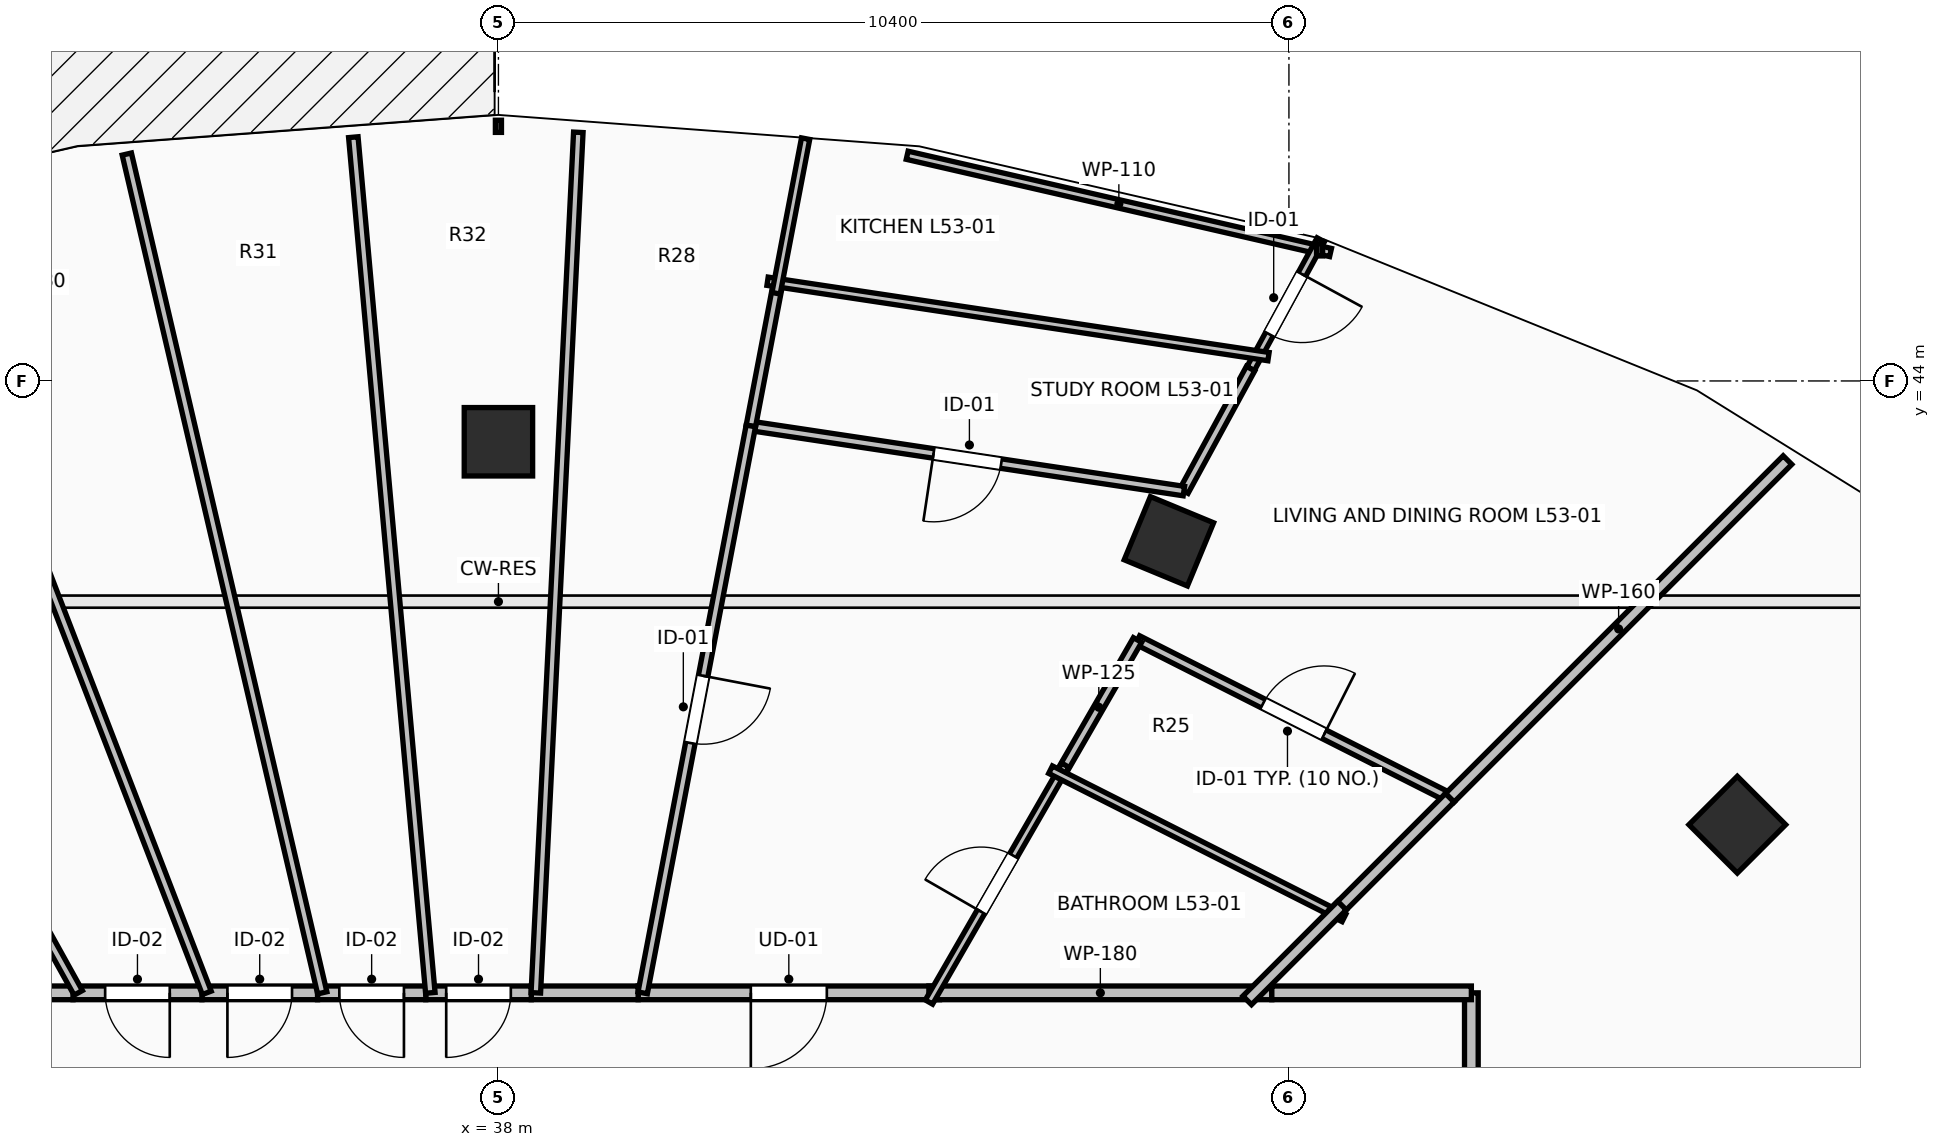
"""IFC4 building model, lengths in metres.
Left out: names, types, materials, properties, quantities, classifications, styles, units other than length and angle.
Written with IfcOpenShell. Run it as: python <this file> out.ifc"""

import sys

from ifc_helpers import new_model, si_unit, direction, frame, frame_2d, origin, origin_2d, place, context, subcontext, project, spatial, rectangle, extrude, element, fill, save


model = new_model("IFC4")
c1 = context("Model", 3, precision=1e-05, world=origin(), true_north=direction((0.0, 1.0)))
c2 = subcontext(c1, "Body", "Model", "MODEL_VIEW")
j1 = project(units=[si_unit("LENGTHUNIT", "METRE"), si_unit("PLANEANGLEUNIT", "RADIAN")], contexts=[c1])
p1 = place(None, origin())
s1 = spatial("IfcSite", under=j1, at=p1, CompositionType="ELEMENT")
p2 = place(p1, origin())
s2 = spatial("IfcBuilding", under=s1, at=p2, CompositionType="ELEMENT")
p3 = place(p2, frame((0.0, 0.0, 196.6)))
s3 = spatial("IfcBuildingStorey", under=s2, at=p3, CompositionType="ELEMENT", Elevation=196.6)
for number, where, z_axis, x_axis in (
    (1, (54.299, 38.162, 0.0), (0.0, 0.0, 1.0), (0.707, 0.707, 0.0)),
    (2, (46.821, 41.891, 0.0), (0.0, 0.0, 1.0), (0.383, 0.924, 0.0)),
    (3, (38.0, 43.2, 0.0), (0.0, 0.0, 1.0), (0.0, 1.0, 0.0)),
):
    element("IfcColumn", number, at=place(p3, frame(where, z_axis=z_axis, x_axis=x_axis)), inside=s3, PredefinedType="COLUMN", context=c2, shape_type="SweptSolid", body=[
        extrude(rectangle(XDim=0.9, YDim=0.9, at=origin_2d()), origin(), (0.0, 0.0, 1.0), 3.5),
    ])
p4 = place(p3, frame((43.803, 35.95, 0.0), z_axis=(0.0, 0.0, 1.0), x_axis=(-1.0, 0.0, 0.0)))
e4 = element("IfcWall", 4, at=p4, inside=s3, PredefinedType="PARTITIONING", context=c2, shape_type="SweptSolid", body=[
    extrude(rectangle(XDim=3.965, YDim=0.18, at=frame_2d((1.982, 0.0))), origin(), (0.0, 0.0, 1.0), 3.24),
])
p5 = place(p4, frame((1.482, 0.0, 0.0)))
e5 = element("IfcOpeningElement", 5, at=p5, cuts=e4, PredefinedType="OPENING", context=c2, shape_type="SweptSolid", body=[
    extrude(rectangle(XDim=1.0, YDim=2.15, at=frame_2d((0.5, 1.075))), frame((0.0, 0.105, 0.0), z_axis=(0.0, -1.0, 0.0), x_axis=(1.0, 0.0, 0.0)), (0.0, 0.0, 1.0), 0.21),
])
p6 = place(p3, frame((48.175, 35.95, 0.0), z_axis=(0.0, 0.0, 1.0), x_axis=(-1.0, 0.0, 0.0)))
e6 = element("IfcWall", 6, at=p6, inside=s3, PredefinedType="PARTITIONING", context=c2, shape_type="SweptSolid", body=[
    extrude(rectangle(XDim=4.512, YDim=0.18, at=frame_2d((2.256, 0.0))), origin(), (0.0, 0.0, 1.0), 2.432),
])
p7 = place(p3, frame((39.838, 35.95, 0.0), z_axis=(0.0, 0.0, 1.0), x_axis=(-1.0, 0.0, 0.0)))
e7 = element("IfcWall", 7, at=p7, inside=s3, PredefinedType="PARTITIONING", context=c2, shape_type="SweptSolid", body=[
    extrude(rectangle(XDim=1.406, YDim=0.18, at=frame_2d((0.703, 0.0))), origin(), (0.0, 0.0, 1.0), 3.24),
])
p8 = place(p3, frame((38.432, 35.95, 0.0), z_axis=(0.0, 0.0, 1.0), x_axis=(-1.0, 0.0, 0.0)))
e8 = element("IfcWall", 8, at=p8, inside=s3, PredefinedType="PARTITIONING", context=c2, shape_type="SweptSolid", body=[
    extrude(rectangle(XDim=1.388, YDim=0.18, at=frame_2d((0.694, 0.0))), origin(), (0.0, 0.0, 1.0), 3.24),
])
p9 = place(p8, frame((0.269, 0.0, 0.0)))
e9 = element("IfcOpeningElement", 9, at=p9, cuts=e8, PredefinedType="OPENING", context=c2, shape_type="SweptSolid", body=[
    extrude(rectangle(XDim=0.85, YDim=2.1, at=frame_2d((0.425, 1.05))), frame((0.0, 0.105, 0.0), z_axis=(0.0, -1.0, 0.0), x_axis=(1.0, 0.0, 0.0)), (0.0, 0.0, 1.0), 0.21),
])
p10 = place(p3, frame((37.044, 35.95, 0.0), z_axis=(0.0, 0.0, 1.0), x_axis=(-1.0, 0.0, 0.0)))
e10 = element("IfcWall", 10, at=p10, inside=s3, PredefinedType="PARTITIONING", context=c2, shape_type="SweptSolid", body=[
    extrude(rectangle(XDim=1.424, YDim=0.18, at=frame_2d((0.712, 0.0))), origin(), (0.0, 0.0, 1.0), 3.24),
])
p11 = place(p10, frame((0.287, 0.0, 0.0)))
e11 = element("IfcOpeningElement", 11, at=p11, cuts=e10, PredefinedType="OPENING", context=c2, shape_type="SweptSolid", body=[
    extrude(rectangle(XDim=0.85, YDim=2.1, at=frame_2d((0.425, 1.05))), frame((0.0, 0.105, 0.0), z_axis=(0.0, -1.0, 0.0), x_axis=(1.0, 0.0, 0.0)), (0.0, 0.0, 1.0), 0.21),
])
p12 = place(p3, frame((35.62, 35.95, 0.0), z_axis=(0.0, 0.0, 1.0), x_axis=(-1.0, 0.0, 0.0)))
e12 = element("IfcWall", 12, at=p12, inside=s3, PredefinedType="PARTITIONING", context=c2, shape_type="SweptSolid", body=[
    extrude(rectangle(XDim=1.521, YDim=0.18, at=frame_2d((0.76, 0.0))), origin(), (0.0, 0.0, 1.0), 3.24),
])
p13 = place(p12, frame((0.335, 0.0, 0.0)))
e13 = element("IfcOpeningElement", 13, at=p13, cuts=e12, PredefinedType="OPENING", context=c2, shape_type="SweptSolid", body=[
    extrude(rectangle(XDim=0.85, YDim=2.1, at=frame_2d((0.425, 1.05))), frame((0.0, 0.105, 0.0), z_axis=(0.0, -1.0, 0.0), x_axis=(1.0, 0.0, 0.0)), (0.0, 0.0, 1.0), 0.21),
])
p14 = place(p3, frame((34.099, 35.95, 0.0), z_axis=(0.0, 0.0, 1.0), x_axis=(-1.0, 0.0, 0.0)))
e14 = element("IfcWall", 14, at=p14, inside=s3, PredefinedType="PARTITIONING", context=c2, shape_type="SweptSolid", body=[
    extrude(rectangle(XDim=1.696, YDim=0.18, at=frame_2d((0.848, 0.0))), origin(), (0.0, 0.0, 1.0), 3.24),
])
p15 = place(p14, frame((0.423, 0.0, 0.0)))
e15 = element("IfcOpeningElement", 15, at=p15, cuts=e14, PredefinedType="OPENING", context=c2, shape_type="SweptSolid", body=[
    extrude(rectangle(XDim=0.85, YDim=2.1, at=frame_2d((0.425, 1.05))), frame((0.0, 0.105, 0.0), z_axis=(0.0, -1.0, 0.0), x_axis=(1.0, 0.0, 0.0)), (0.0, 0.0, 1.0), 0.21),
])
p16 = place(p3, frame((32.403, 35.95, 0.0), z_axis=(0.0, 0.0, 1.0), x_axis=(-1.0, 0.0, 0.0)))
e16 = element("IfcWall", 16, at=p16, inside=s3, PredefinedType="PARTITIONING", context=c2, shape_type="SweptSolid", body=[
    extrude(rectangle(XDim=1.984, YDim=0.18, at=frame_2d((0.992, 0.0))), origin(), (0.0, 0.0, 1.0), 2.432),
])
p17 = place(p16, frame((0.567, 0.0, 0.0)))
e17 = element("IfcOpeningElement", 17, at=p17, cuts=e16, PredefinedType="OPENING", context=c2, shape_type="SweptSolid", body=[
    extrude(rectangle(XDim=0.85, YDim=2.1, at=frame_2d((0.425, 1.05))), frame((0.0, 0.105, 0.0), z_axis=(0.0, -1.0, 0.0), x_axis=(1.0, 0.0, 0.0)), (0.0, 0.0, 1.0), 0.21),
])
p18 = place(p3, frame((50.8, 27.25, 0.0), z_axis=(0.0, 0.0, 1.0), x_axis=(0.0, 1.0, 0.0)))
e18 = element("IfcWall", 18, at=p18, inside=s3, PredefinedType="PARTITIONING", context=c2, shape_type="SweptSolid", body=[
    extrude(rectangle(XDim=8.7, YDim=0.18, at=frame_2d((4.35, 0.0))), origin(), (0.0, 0.0, 1.0), 2.432),
])
p19 = place(p3, frame((50.8, 35.95, 0.0), z_axis=(0.0, 0.0, 1.0), x_axis=(-1.0, 0.0, 0.0)))
e19 = element("IfcWall", 19, at=p19, inside=s3, PredefinedType="PARTITIONING", context=c2, shape_type="SweptSolid", body=[
    extrude(rectangle(XDim=2.625, YDim=0.18, at=frame_2d((1.312, 0.0))), origin(), (0.0, 0.0, 1.0), 2.432),
])
p20 = place(p3, frame((46.408, 40.592, 0.0), z_axis=(0.0, 0.0, 1.0), x_axis=(0.89252026196, -0.451007297049, 0.0)))
e20 = element("IfcWall", 20, at=p20, inside=s3, PredefinedType="PARTITIONING", context=c2, shape_type="SweptSolid", body=[
    extrude(rectangle(XDim=4.603, YDim=0.125, at=frame_2d((2.301, 0.0))), origin(), (0.0, 0.0, 1.0), 2.432),
])
p21 = place(p20, frame((1.851, 0.0, 0.0)))
e21 = element("IfcOpeningElement", 21, at=p21, cuts=e20, PredefinedType="OPENING", context=c2, shape_type="SweptSolid", body=[
    extrude(rectangle(XDim=0.9, YDim=2.1, at=frame_2d((0.45, 1.05))), frame((0.0, 0.077, 0.0), z_axis=(0.0, -1.0, 0.0), x_axis=(1.0, 0.0, 0.0)), (0.0, 0.0, 1.0), 0.155),
])
p22 = place(p3, frame((45.389, 38.823, 0.0), z_axis=(0.0, 0.0, 1.0), x_axis=(0.499149502221, 0.866515882389, 0.0)))
e22 = element("IfcWall", 22, at=p22, inside=s3, PredefinedType="PARTITIONING", context=c2, shape_type="SweptSolid", body=[
    extrude(rectangle(XDim=2.042, YDim=0.125, at=frame_2d((1.021, 0.0))), origin(), (0.0, 0.0, 1.0), 2.922),
])
p23 = place(p3, frame((43.664, 35.829, 0.0), z_axis=(0.0, 0.0, 1.0), x_axis=(0.49917767271, 0.866499654396, 0.0)))
e23 = element("IfcWall", 23, at=p23, inside=s3, PredefinedType="PARTITIONING", context=c2, shape_type="SweptSolid", body=[
    extrude(rectangle(XDim=3.596, YDim=0.11, at=frame_2d((1.798, 0.0))), origin(), (0.0, 0.0, 1.0), 2.972),
])
p24 = place(p23, frame((1.373, 0.0, 0.0)))
e24 = element("IfcOpeningElement", 24, at=p24, cuts=e23, PredefinedType="OPENING", context=c2, shape_type="SweptSolid", body=[
    extrude(rectangle(XDim=0.85, YDim=2.1, at=frame_2d((0.425, 1.05))), frame((0.0, 0.07, 0.0), z_axis=(0.0, -1.0, 0.0), x_axis=(1.0, 0.0, 0.0)), (0.0, 0.0, 1.0), 0.14),
])
p25 = place(p3, frame((48.948, 45.69, 0.0), z_axis=(0.0, 0.0, 1.0), x_axis=(-0.974613198555, 0.223895317508, 0.0)))
e25 = element("IfcWall", 25, at=p25, inside=s3, PredefinedType="PARTITIONING", context=c2, shape_type="SweptSolid", body=[
    extrude(rectangle(XDim=5.715, YDim=0.11, at=frame_2d((2.857, 0.0))), origin(), (0.0, 0.0, 1.0), 3.24),
])
p26 = place(p3, frame((48.819, 45.857, 0.0), z_axis=(0.0, 0.0, 1.0), x_axis=(-0.478311376557, -0.878190313689, 0.0)))
e26 = element("IfcWall", 26, at=p26, inside=s3, PredefinedType="PARTITIONING", context=c2, shape_type="SweptSolid", body=[
    extrude(rectangle(XDim=1.93, YDim=0.11, at=frame_2d((0.965, 0.0))), origin(), (0.0, 0.0, 1.0), 3.24),
])
p27 = place(p26, frame((0.515, 0.0, 0.0)))
e27 = element("IfcOpeningElement", 27, at=p27, cuts=e26, PredefinedType="OPENING", context=c2, shape_type="SweptSolid", body=[
    extrude(rectangle(XDim=0.9, YDim=2.1, at=frame_2d((0.45, 1.05))), frame((0.0, 0.07, 0.0), z_axis=(0.0, -1.0, 0.0), x_axis=(1.0, 0.0, 0.0)), (0.0, 0.0, 1.0), 0.14),
])
p28 = place(p3, frame((47.896, 44.162, 0.0), z_axis=(0.0, 0.0, 1.0), x_axis=(-0.47839521225, -0.87814464691, 0.0)))
e28 = element("IfcWall", 28, at=p28, inside=s3, PredefinedType="PARTITIONING", context=c2, shape_type="SweptSolid", body=[
    extrude(rectangle(XDim=1.835, YDim=0.125, at=frame_2d((0.917, 0.0))), origin(), (0.0, 0.0, 1.0), 3.24),
])
p29 = place(p3, frame((47.018, 42.551, 0.0), z_axis=(0.0, 0.0, 1.0), x_axis=(-0.98887565722, 0.148744527827, 0.0)))
e29 = element("IfcWall", 29, at=p29, inside=s3, PredefinedType="PARTITIONING", context=c2, shape_type="SweptSolid", body=[
    extrude(rectangle(XDim=5.761, YDim=0.125, at=frame_2d((2.881, 0.0))), origin(), (0.0, 0.0, 1.0), 3.24),
])
p30 = place(p29, frame((2.43, 0.0, 0.0)))
e30 = element("IfcOpeningElement", 30, at=p30, cuts=e29, PredefinedType="OPENING", context=c2, shape_type="SweptSolid", body=[
    extrude(rectangle(XDim=0.9, YDim=2.1, at=frame_2d((0.45, 1.05))), frame((0.0, 0.077, 0.0), z_axis=(0.0, -1.0, 0.0), x_axis=(1.0, 0.0, 0.0)), (0.0, 0.0, 1.0), 0.155),
])
p31 = place(p3, frame((41.321, 43.408, 0.0), z_axis=(0.0, 0.0, 1.0), x_axis=(0.187217449549, 0.982318495491, 0.0)))
e31 = element("IfcWall", 31, at=p31, inside=s3, PredefinedType="PARTITIONING", context=c2, shape_type="SweptSolid", body=[
    extrude(rectangle(XDim=1.917, YDim=0.125, at=frame_2d((0.958, 0.0))), origin(), (0.0, 0.0, 1.0), 3.24),
])
p32 = place(p3, frame((41.321, 43.408, 0.0), z_axis=(0.0, 0.0, 1.0), x_axis=(-0.187401709503, -0.982283359971, 0.0)))
e32 = element("IfcWall", 32, at=p32, inside=s3, PredefinedType="PARTITIONING", context=c2, shape_type="SweptSolid", body=[
    extrude(rectangle(XDim=7.593, YDim=0.125, at=frame_2d((3.796, 0.0))), origin(), (0.0, 0.0, 1.0), 2.774),
])
p33 = place(p32, frame((3.346, 0.0, 0.0)))
e33 = element("IfcOpeningElement", 33, at=p33, cuts=e32, PredefinedType="OPENING", context=c2, shape_type="SweptSolid", body=[
    extrude(rectangle(XDim=0.9, YDim=2.1, at=frame_2d((0.45, 1.05))), frame((0.0, 0.077, 0.0), z_axis=(0.0, -1.0, 0.0), x_axis=(1.0, 0.0, 0.0)), (0.0, 0.0, 1.0), 0.155),
])
p34 = place(p3, frame((50.516, 38.516, 0.0), z_axis=(0.0, 0.0, 1.0), x_axis=(0.707106781187, 0.707106781187, 0.0)))
e34 = element("IfcWall", 34, at=p34, inside=s3, PredefinedType="PARTITIONING", context=c2, shape_type="SweptSolid", body=[
    extrude(rectangle(XDim=6.283, YDim=0.16, at=frame_2d((3.142, 0.0))), origin(), (0.0, 0.0, 1.0), 2.774),
])
p35 = place(p3, frame((45.264, 38.886, 0.0), z_axis=(0.0, 0.0, 1.0), x_axis=(0.892556527512, -0.450935522216, 0.0)))
e35 = element("IfcWall", 35, at=p35, inside=s3, PredefinedType="PARTITIONING", context=c2, shape_type="SweptSolid", body=[
    extrude(rectangle(XDim=4.325, YDim=0.11, at=frame_2d((2.162, 0.0))), origin(), (0.0, 0.0, 1.0), 2.432),
])
p36 = place(p3, frame((48.999, 36.999, 0.0), z_axis=(0.0, 0.0, 1.0), x_axis=(0.707106781187, 0.707106781187, 0.0)))
e36 = element("IfcWall", 36, at=p36, inside=s3, PredefinedType="PARTITIONING", context=c2, shape_type="SweptSolid", body=[
    extrude(rectangle(XDim=2.146, YDim=0.16, at=frame_2d((1.073, 0.0))), origin(), (0.0, 0.0, 1.0), 2.922),
])
p37 = place(p3, frame((47.851, 35.851, 0.0), z_axis=(0.0, 0.0, 1.0), x_axis=(0.707106781187, 0.707106781187, 0.0)))
e37 = element("IfcWall", 37, at=p37, inside=s3, PredefinedType="PARTITIONING", context=c2, shape_type="SweptSolid", body=[
    extrude(rectangle(XDim=1.763, YDim=0.16, at=frame_2d((0.882, 0.0))), origin(), (0.0, 0.0, 1.0), 2.432),
])
p38 = place(p3, frame((41.541, 45.312, 0.0), z_axis=(0.0, 0.0, 1.0), x_axis=(0.988873931206, -0.148756002172, 0.0)))
e38 = element("IfcWall", 38, at=p38, inside=s3, PredefinedType="PARTITIONING", context=c2, shape_type="SweptSolid", body=[
    extrude(rectangle(XDim=6.665, YDim=0.11, at=frame_2d((3.333, 0.0))), origin(), (0.0, 0.0, 1.0), 3.24),
])
p39 = place(p3, frame((42.041, 47.188, 0.0), z_axis=(0.0, 0.0, 1.0), x_axis=(-0.187605166264, -0.982244522301, 0.0)))
e39 = element("IfcWall", 39, at=p39, inside=s3, PredefinedType="PARTITIONING", context=c2, shape_type="SweptSolid", body=[
    extrude(rectangle(XDim=2.071, YDim=0.11, at=frame_2d((1.035, 0.0))), origin(), (0.0, 0.0, 1.0), 3.24),
])
p40 = place(p3, frame((39.051, 47.271, 0.0), z_axis=(0.0, 0.0, 1.0), x_axis=(-0.049324203907, -0.998782820692, 0.0)))
e40 = element("IfcWall", 40, at=p40, inside=s3, PredefinedType="PARTITIONING", context=c2, shape_type="SweptSolid", body=[
    extrude(rectangle(XDim=11.335, YDim=0.125, at=frame_2d((5.667, 0.0))), origin(), (0.0, 0.0, 1.0), 2.774),
])
p41 = place(p3, frame((36.091, 47.207, 0.0), z_axis=(0.0, 0.0, 1.0), x_axis=(0.089620343685, -0.995976000714, 0.0)))
e41 = element("IfcWall", 41, at=p41, inside=s3, PredefinedType="PARTITIONING", context=c2, shape_type="SweptSolid", body=[
    extrude(rectangle(XDim=11.302, YDim=0.125, at=frame_2d((5.651, 0.0))), origin(), (0.0, 0.0, 1.0), 2.432),
])
p42 = place(p3, frame((33.111, 46.985, 0.0), z_axis=(0.0, 0.0, 1.0), x_axis=(0.226889028745, -0.973920617214, 0.0)))
e42 = element("IfcWall", 42, at=p42, inside=s3, PredefinedType="PARTITIONING", context=c2, shape_type="SweptSolid", body=[
    extrude(rectangle(XDim=11.331, YDim=0.125, at=frame_2d((5.665, 0.0))), origin(), (0.0, 0.0, 1.0), 2.432),
])
p43 = place(p3, frame((30.135, 46.398, 0.0), z_axis=(0.0, 0.0, 1.0), x_axis=(0.359727007777, -0.933057597298, 0.0)))
e43 = element("IfcWall", 43, at=p43, inside=s3, PredefinedType="PARTITIONING", context=c2, shape_type="SweptSolid", body=[
    extrude(rectangle(XDim=11.198, YDim=0.125, at=frame_2d((5.599, 0.0))), origin(), (0.0, 0.0, 1.0), 2.432),
])
p44 = place(p3, frame((27.069, 45.673, 0.0), z_axis=(0.0, 0.0, 1.0), x_axis=(0.485717471054, -0.874115860921, 0.0)))
e44 = element("IfcWall", 44, at=p44, inside=s3, PredefinedType="PARTITIONING", context=c2, shape_type="SweptSolid", body=[
    extrude(rectangle(XDim=11.123, YDim=0.125, at=frame_2d((5.562, 0.0))), origin(), (0.0, 0.0, 1.0), 2.432),
])
p45 = place(p5, origin())
e45 = element("IfcDoor", 45, at=p45, inside=s3, OperationType="SINGLE_SWING_RIGHT", PredefinedType="DOOR", context=c2, shape_type="SweptSolid", body=[
    extrude(rectangle(XDim=1.0, YDim=2.15, at=frame_2d((0.5, 1.075))), frame((0.0, 0.025, 0.0), z_axis=(0.0, -1.0, 0.0), x_axis=(1.0, 0.0, 0.0)), (0.0, 0.0, 1.0), 0.05),
])
fill(e5, e45)
p46 = place(p21, origin())
e46 = element("IfcDoor", 46, at=p46, inside=s3, OperationType="SINGLE_SWING_RIGHT", PredefinedType="DOOR", context=c2, shape_type="SweptSolid", body=[
    extrude(rectangle(XDim=0.9, YDim=2.1, at=frame_2d((0.45, 1.05))), frame((0.0, 0.025, 0.0), z_axis=(0.0, -1.0, 0.0), x_axis=(1.0, 0.0, 0.0)), (0.0, 0.0, 1.0), 0.05),
])
fill(e21, e46)
p47 = place(p24, origin())
e47 = element("IfcDoor", 47, at=p47, inside=s3, OperationType="SINGLE_SWING_LEFT", PredefinedType="DOOR", context=c2, shape_type="SweptSolid", body=[
    extrude(rectangle(XDim=0.85, YDim=2.1, at=frame_2d((0.425, 1.05))), frame((0.0, 0.025, 0.0), z_axis=(0.0, -1.0, 0.0), x_axis=(1.0, 0.0, 0.0)), (0.0, 0.0, 1.0), 0.05),
])
fill(e24, e47)
p48 = place(p27, origin())
e48 = element("IfcDoor", 48, at=p48, inside=s3, OperationType="SINGLE_SWING_LEFT", PredefinedType="DOOR", context=c2, shape_type="SweptSolid", body=[
    extrude(rectangle(XDim=0.9, YDim=2.1, at=frame_2d((0.45, 1.05))), frame((0.0, 0.025, 0.0), z_axis=(0.0, -1.0, 0.0), x_axis=(1.0, 0.0, 0.0)), (0.0, 0.0, 1.0), 0.05),
])
fill(e27, e48)
p49 = place(p30, origin())
e49 = element("IfcDoor", 49, at=p49, inside=s3, OperationType="SINGLE_SWING_RIGHT", PredefinedType="DOOR", context=c2, shape_type="SweptSolid", body=[
    extrude(rectangle(XDim=0.9, YDim=2.1, at=frame_2d((0.45, 1.05))), frame((0.0, 0.025, 0.0), z_axis=(0.0, -1.0, 0.0), x_axis=(1.0, 0.0, 0.0)), (0.0, 0.0, 1.0), 0.05),
])
fill(e30, e49)
p50 = place(p33, origin())
e50 = element("IfcDoor", 50, at=p50, inside=s3, OperationType="SINGLE_SWING_LEFT", PredefinedType="DOOR", context=c2, shape_type="SweptSolid", body=[
    extrude(rectangle(XDim=0.9, YDim=2.1, at=frame_2d((0.45, 1.05))), frame((0.0, 0.025, 0.0), z_axis=(0.0, -1.0, 0.0), x_axis=(1.0, 0.0, 0.0)), (0.0, 0.0, 1.0), 0.05),
])
fill(e33, e50)
p51 = place(p9, origin())
e51 = element("IfcDoor", 51, at=p51, inside=s3, OperationType="SINGLE_SWING_RIGHT", PredefinedType="DOOR", context=c2, shape_type="SweptSolid", body=[
    extrude(rectangle(XDim=0.85, YDim=2.1, at=frame_2d((0.425, 1.05))), frame((0.0, 0.025, 0.0), z_axis=(0.0, -1.0, 0.0), x_axis=(1.0, 0.0, 0.0)), (0.0, 0.0, 1.0), 0.05),
])
fill(e9, e51)
p52 = place(p11, origin())
e52 = element("IfcDoor", 52, at=p52, inside=s3, OperationType="SINGLE_SWING_LEFT", PredefinedType="DOOR", context=c2, shape_type="SweptSolid", body=[
    extrude(rectangle(XDim=0.85, YDim=2.1, at=frame_2d((0.425, 1.05))), frame((0.0, 0.025, 0.0), z_axis=(0.0, -1.0, 0.0), x_axis=(1.0, 0.0, 0.0)), (0.0, 0.0, 1.0), 0.05),
])
fill(e11, e52)
p53 = place(p13, origin())
e53 = element("IfcDoor", 53, at=p53, inside=s3, OperationType="SINGLE_SWING_RIGHT", PredefinedType="DOOR", context=c2, shape_type="SweptSolid", body=[
    extrude(rectangle(XDim=0.85, YDim=2.1, at=frame_2d((0.425, 1.05))), frame((0.0, 0.025, 0.0), z_axis=(0.0, -1.0, 0.0), x_axis=(1.0, 0.0, 0.0)), (0.0, 0.0, 1.0), 0.05),
])
fill(e13, e53)
p54 = place(p15, origin())
e54 = element("IfcDoor", 54, at=p54, inside=s3, OperationType="SINGLE_SWING_LEFT", PredefinedType="DOOR", context=c2, shape_type="SweptSolid", body=[
    extrude(rectangle(XDim=0.85, YDim=2.1, at=frame_2d((0.425, 1.05))), frame((0.0, 0.025, 0.0), z_axis=(0.0, -1.0, 0.0), x_axis=(1.0, 0.0, 0.0)), (0.0, 0.0, 1.0), 0.05),
])
fill(e15, e54)
save(model, sys.argv[1])
